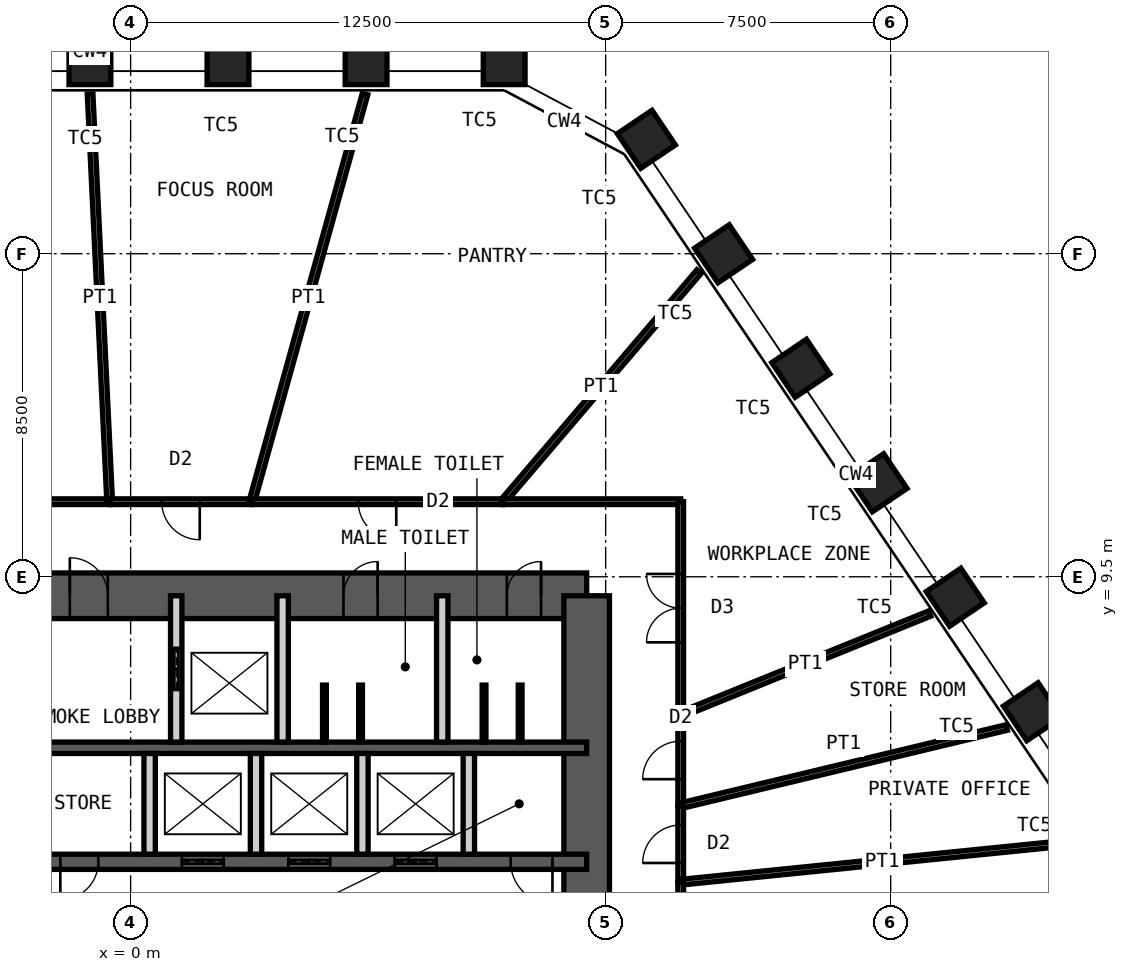
"""IFC4 building model, lengths in metres.
Left out: names, types, materials, properties, quantities, classifications, styles, units other than length and angle.
Written with IfcOpenShell. Run it as: python <this file> out.ifc"""

import sys

from ifc_helpers import new_model, si_unit, direction, frame, frame_2d, origin, origin_2d, place, context, subcontext, project, spatial, rectangle, hollow_rectangle, extrude, element, fill, save


model = new_model("IFC4")
c1 = context("Model", 3, precision=1e-05, world=origin(), true_north=direction((0.0, 1.0)))
c2 = subcontext(c1, "Body", "Model", "MODEL_VIEW")
j1 = project(units=[si_unit("LENGTHUNIT", "METRE"), si_unit("PLANEANGLEUNIT", "RADIAN")], contexts=[c1])
p1 = place(None, origin())
s1 = spatial("IfcSite", under=j1, at=p1, CompositionType="ELEMENT")
p2 = place(p1, origin())
s2 = spatial("IfcBuilding", under=s1, at=p2, CompositionType="ELEMENT")
p3 = place(p2, frame((0.0, 0.0, 214.0)))
s3 = spatial("IfcBuildingStorey", under=s2, at=p3, CompositionType="ELEMENT", Elevation=214.0)
for number, where, z_axis, x_axis in (
    (1, (-1.071, 23.0, 0.0), (0.0, 0.0, 1.0), (-1.0, 0.0, 0.0)),
    (2, (2.562, 23.0, 0.0), (0.0, 0.0, 1.0), (-1.0, 0.0, 0.0)),
    (3, (6.196, 23.0, 0.0), (0.0, 0.0, 1.0), (-1.0, 0.0, 0.0)),
    (4, (9.829, 23.0, 0.0), (0.0, 0.0, 1.0), (-1.0, 0.0, 0.0)),
    (5, (13.571, 21.01, 0.0), (0.0, 0.0, 1.0), (-0.559, 0.829, 0.0)),
    (6, (15.603, 17.998, 0.0), (0.0, 0.0, 1.0), (-0.559, 0.829, 0.0)),
    (7, (17.635, 14.986, 0.0), (0.0, 0.0, 1.0), (-0.559, 0.829, 0.0)),
    (8, (19.667, 11.973, 0.0), (0.0, 0.0, 1.0), (-0.559, 0.829, 0.0)),
    (9, (21.699, 8.961, 0.0), (0.0, 0.0, 1.0), (-0.559, 0.829, 0.0)),
    (10, (23.731, 5.948, 0.0), (0.0, 0.0, 1.0), (-0.559, 0.829, 0.0)),
):
    element("IfcColumn", number, at=place(p3, frame(where, z_axis=z_axis, x_axis=x_axis)), inside=s3, PredefinedType="COLUMN", context=c2, shape_type="SweptSolid", body=[
        extrude(hollow_rectangle(XDim=1.1, YDim=1.1, WallThickness=0.07, at=origin_2d()), origin(), (0.0, 0.0, 1.0), 4.2),
    ])
p4 = place(p3, frame((-12.0, 9.0, 0.0), z_axis=(0.0, 0.0, 1.0), x_axis=(1.0, 0.0, 0.0)))
e11 = element("IfcWall", 11, at=p4, inside=s3, PredefinedType="SHEAR", context=c2, shape_type="SweptSolid", body=[
    extrude(rectangle(XDim=24.0, YDim=1.2, at=frame_2d((12.0, 0.0))), origin(), (0.0, 0.0, 1.0), 4.2),
])
p5 = place(p4, frame((10.4, 0.0, 0.0)))
e12 = element("IfcOpeningElement", 12, at=p5, cuts=e11, PredefinedType="OPENING", context=c2, shape_type="SweptSolid", body=[
    extrude(rectangle(XDim=1.0, YDim=2.1, at=frame_2d((0.5, 1.05))), frame((0.0, 0.61, 0.0), z_axis=(0.0, -1.0, 0.0), x_axis=(1.0, 0.0, 0.0)), (0.0, 0.0, 1.0), 1.22),
])
p6 = place(p4, frame((17.6, 0.0, 0.0)))
e13 = element("IfcOpeningElement", 13, at=p6, cuts=e11, PredefinedType="OPENING", context=c2, shape_type="SweptSolid", body=[
    extrude(rectangle(XDim=0.9, YDim=2.1, at=frame_2d((0.45, 1.05))), frame((0.0, 0.61, 0.0), z_axis=(0.0, -1.0, 0.0), x_axis=(1.0, 0.0, 0.0)), (0.0, 0.0, 1.0), 1.22),
])
p7 = place(p4, frame((21.9, 0.0, 0.0)))
e14 = element("IfcOpeningElement", 14, at=p7, cuts=e11, PredefinedType="OPENING", context=c2, shape_type="SweptSolid", body=[
    extrude(rectangle(XDim=0.9, YDim=2.1, at=frame_2d((0.45, 1.05))), frame((0.0, 0.61, 0.0), z_axis=(0.0, -1.0, 0.0), x_axis=(1.0, 0.0, 0.0)), (0.0, 0.0, 1.0), 1.22),
])
p8 = place(p3, frame((12.0, -9.0, 0.0), z_axis=(0.0, 0.0, 1.0), x_axis=(0.0, 1.0, 0.0)))
e15 = element("IfcWall", 15, at=p8, inside=s3, PredefinedType="SHEAR", context=c2, shape_type="SweptSolid", body=[
    extrude(rectangle(XDim=18.0, YDim=1.2, at=frame_2d((9.0, 0.0))), origin(), (0.0, 0.0, 1.0), 4.2),
])
p9 = place(p8, frame((8.1, 0.0, 0.0)))
e16 = element("IfcOpeningElement", 16, at=p9, cuts=e15, PredefinedType="OPENING", context=c2, shape_type="SweptSolid", body=[
    extrude(rectangle(XDim=1.8, YDim=2.1, at=frame_2d((0.9, 1.05))), frame((0.0, 0.61, 0.0), z_axis=(0.0, -1.0, 0.0), x_axis=(1.0, 0.0, 0.0)), (0.0, 0.0, 1.0), 1.22),
])
p10 = place(p3, frame((-12.0, 5.0, 0.0), z_axis=(0.0, 0.0, 1.0), x_axis=(1.0, 0.0, 0.0)))
e17 = element("IfcWall", 17, at=p10, inside=s3, PredefinedType="SHEAR", context=c2, shape_type="SweptSolid", body=[
    extrude(rectangle(XDim=24.0, YDim=0.3, at=frame_2d((12.0, 0.0))), origin(), (0.0, 0.0, 1.0), 4.2),
])
p11 = place(p3, frame((-12.0, 2.0, 0.0), z_axis=(0.0, 0.0, 1.0), x_axis=(1.0, 0.0, 0.0)))
e18 = element("IfcWall", 18, at=p11, inside=s3, PredefinedType="SHEAR", context=c2, shape_type="SweptSolid", body=[
    extrude(rectangle(XDim=24.0, YDim=0.4, at=frame_2d((12.0, 0.0))), origin(), (0.0, 0.0, 1.0), 4.2),
])
p12 = place(p11, frame((2.4, 0.0, 0.0)))
e19 = element("IfcOpeningElement", 19, at=p12, cuts=e18, PredefinedType="OPENING", context=c2, shape_type="SweptSolid", body=[
    extrude(rectangle(XDim=1.1, YDim=2.1, at=frame_2d((0.55, 1.05))), frame((0.0, 0.21, 0.0), z_axis=(0.0, -1.0, 0.0), x_axis=(1.0, 0.0, 0.0)), (0.0, 0.0, 1.0), 0.42),
])
p13 = place(p11, frame((22.0, 0.0, 0.0)))
e20 = element("IfcOpeningElement", 20, at=p13, cuts=e18, PredefinedType="OPENING", context=c2, shape_type="SweptSolid", body=[
    extrude(rectangle(XDim=1.1, YDim=2.1, at=frame_2d((0.55, 1.05))), frame((0.0, 0.21, 0.0), z_axis=(0.0, -1.0, 0.0), x_axis=(1.0, 0.0, 0.0)), (0.0, 0.0, 1.0), 0.42),
])
p14 = place(p11, frame((10.15, 0.0, 0.0)))
e21 = element("IfcOpeningElement", 21, at=p14, cuts=e18, PredefinedType="OPENING", context=c2, shape_type="SweptSolid", body=[
    extrude(rectangle(XDim=1.0, YDim=2.1, at=frame_2d((0.5, 1.05))), frame((0.0, 0.21, 0.0), z_axis=(0.0, -1.0, 0.0), x_axis=(1.0, 0.0, 0.0)), (0.0, 0.0, 1.0), 0.42),
])
p15 = place(p11, frame((6.9, 0.0, 0.0)))
e22 = element("IfcOpeningElement", 22, at=p15, cuts=e18, PredefinedType="OPENING", context=c2, shape_type="SweptSolid", body=[
    extrude(rectangle(XDim=1.0, YDim=2.1, at=frame_2d((0.5, 1.05))), frame((0.0, 0.21, 0.0), z_axis=(0.0, -1.0, 0.0), x_axis=(1.0, 0.0, 0.0)), (0.0, 0.0, 1.0), 0.42),
])
p16 = place(p11, frame((13.35, 0.0, 0.0)))
e23 = element("IfcOpeningElement", 23, at=p16, cuts=e18, PredefinedType="OPENING", context=c2, shape_type="SweptSolid", body=[
    extrude(rectangle(XDim=1.1, YDim=2.4, at=frame_2d((0.55, 1.2))), frame((0.0, 0.21, 0.0), z_axis=(0.0, -1.0, 0.0), x_axis=(1.0, 0.0, 0.0)), (0.0, 0.0, 1.0), 0.42),
])
p17 = place(p11, frame((16.15, 0.0, 0.0)))
e24 = element("IfcOpeningElement", 24, at=p17, cuts=e18, PredefinedType="OPENING", context=c2, shape_type="SweptSolid", body=[
    extrude(rectangle(XDim=1.1, YDim=2.4, at=frame_2d((0.55, 1.2))), frame((0.0, 0.21, 0.0), z_axis=(0.0, -1.0, 0.0), x_axis=(1.0, 0.0, 0.0)), (0.0, 0.0, 1.0), 0.42),
])
p18 = place(p11, frame((18.95, 0.0, 0.0)))
e25 = element("IfcOpeningElement", 25, at=p18, cuts=e18, PredefinedType="OPENING", context=c2, shape_type="SweptSolid", body=[
    extrude(rectangle(XDim=1.1, YDim=2.4, at=frame_2d((0.55, 1.2))), frame((0.0, 0.21, 0.0), z_axis=(0.0, -1.0, 0.0), x_axis=(1.0, 0.0, 0.0)), (0.0, 0.0, 1.0), 0.42),
])
p19 = place(p3, frame((1.2, 5.15, 0.0), z_axis=(0.0, 0.0, 1.0), x_axis=(0.0, 1.0, 0.0)))
e26 = element("IfcWall", 26, at=p19, inside=s3, PredefinedType="PARTITIONING", context=c2, shape_type="SweptSolid", body=[
    extrude(rectangle(XDim=3.85, YDim=0.3, at=frame_2d((1.925, 0.0))), origin(), (0.0, 0.0, 1.0), 3.98),
])
p20 = place(p19, frame((1.375, 0.0, 0.0)))
e27 = element("IfcOpeningElement", 27, at=p20, cuts=e26, PredefinedType="OPENING", context=c2, shape_type="SweptSolid", body=[
    extrude(rectangle(XDim=1.1, YDim=2.4, at=frame_2d((0.55, 1.2))), frame((0.0, 0.16, 0.0), z_axis=(0.0, -1.0, 0.0), x_axis=(1.0, 0.0, 0.0)), (0.0, 0.0, 1.0), 0.32),
])
for number, where, z_axis, x_axis in (
    (28, (4.0, 5.15, 0.0), (0.0, 0.0, 1.0), (0.0, 1.0, 0.0)),
    (29, (8.2, 5.15, 0.0), (0.0, 0.0, 1.0), (0.0, 1.0, 0.0)),
):
    element("IfcWall", number, at=place(p3, frame(where, z_axis=z_axis, x_axis=x_axis)), inside=s3, PredefinedType="PARTITIONING", context=c2, shape_type="SweptSolid", body=[
        extrude(rectangle(XDim=3.85, YDim=0.3, at=frame_2d((1.925, 0.0))), origin(), (0.0, 0.0, 1.0), 3.98),
    ])
for number, where, z_axis, x_axis in (
    (30, (0.5, 2.2, 0.0), (0.0, 0.0, 1.0), (0.0, 1.0, 0.0)),
    (31, (3.3, 2.2, 0.0), (0.0, 0.0, 1.0), (0.0, 1.0, 0.0)),
    (32, (6.1, 2.2, 0.0), (0.0, 0.0, 1.0), (0.0, 1.0, 0.0)),
    (33, (8.9, 2.2, 0.0), (0.0, 0.0, 1.0), (0.0, 1.0, 0.0)),
):
    element("IfcWall", number, at=place(p3, frame(where, z_axis=z_axis, x_axis=x_axis)), inside=s3, PredefinedType="PARTITIONING", context=c2, shape_type="SweptSolid", body=[
        extrude(rectangle(XDim=2.65, YDim=0.3, at=frame_2d((1.325, 0.0))), origin(), (0.0, 0.0, 1.0), 3.98),
    ])
for number, where, z_axis, x_axis in (
    (34, (5.1, 5.15, 0.0), (0.0, 0.0, 1.0), (0.0, 1.0, 0.0)),
    (35, (6.05, 5.15, 0.0), (0.0, 0.0, 1.0), (0.0, 1.0, 0.0)),
    (36, (9.3, 5.15, 0.0), (0.0, 0.0, 1.0), (0.0, 1.0, 0.0)),
    (37, (10.25, 5.15, 0.0), (0.0, 0.0, 1.0), (0.0, 1.0, 0.0)),
):
    element("IfcWall", number, at=place(p3, frame(where, z_axis=z_axis, x_axis=x_axis)), inside=s3, PredefinedType="PARTITIONING", context=c2, shape_type="SweptSolid", body=[
        extrude(rectangle(XDim=1.5, YDim=0.1, at=frame_2d((0.75, 0.0))), origin(), (0.0, 0.0, 1.0), 2.1),
    ])
p21 = place(p3, frame((-10.889, 11.475, 0.0), z_axis=(0.0, 0.0, 1.0), x_axis=(1.0, 0.0, 0.0)))
e38 = element("IfcWall", 38, at=p21, inside=s3, PredefinedType="PARTITIONING", context=c2, shape_type="SweptSolid", body=[
    extrude(rectangle(XDim=10.337, YDim=0.15, at=frame_2d((5.169, 0.0))), origin(), (0.0, 0.0, 1.0), 4.03),
])
p22 = place(p21, frame((4.269, 0.0, 0.0)))
e39 = element("IfcOpeningElement", 39, at=p22, cuts=e38, PredefinedType="OPENING", context=c2, shape_type="SweptSolid", body=[
    extrude(rectangle(XDim=1.8, YDim=2.4, at=frame_2d((0.9, 1.2))), frame((0.0, 0.085, 0.0), z_axis=(0.0, -1.0, 0.0), x_axis=(1.0, 0.0, 0.0)), (0.0, 0.0, 1.0), 0.17),
])
p23 = place(p3, frame((-1.067, 22.2, 0.0), z_axis=(0.0, 0.0, 1.0), x_axis=(0.047998335863, -0.998847415652, 0.0)))
e40 = element("IfcWall", 40, at=p23, inside=s3, PredefinedType="PARTITIONING", context=c2, shape_type="SweptSolid", body=[
    extrude(rectangle(XDim=10.738, YDim=0.15, at=frame_2d((5.369, 0.0))), origin(), (0.0, 0.0, 1.0), 3.43),
])
p24 = place(p3, frame((-0.551, 11.475, 0.0), z_axis=(0.0, 0.0, 1.0), x_axis=(1.0, 0.0, 0.0)))
e41 = element("IfcWall", 41, at=p24, inside=s3, PredefinedType="PARTITIONING", context=c2, shape_type="SweptSolid", body=[
    extrude(rectangle(XDim=3.74, YDim=0.15, at=frame_2d((1.87, 0.0))), origin(), (0.0, 0.0, 1.0), 4.03),
])
p25 = place(p24, frame((1.37, 0.0, 0.0)))
e42 = element("IfcOpeningElement", 42, at=p25, cuts=e41, PredefinedType="OPENING", context=c2, shape_type="SweptSolid", body=[
    extrude(rectangle(XDim=1.0, YDim=2.4, at=frame_2d((0.5, 1.2))), frame((0.0, 0.085, 0.0), z_axis=(0.0, -1.0, 0.0), x_axis=(1.0, 0.0, 0.0)), (0.0, 0.0, 1.0), 0.17),
])
p26 = place(p3, frame((6.169, 22.204, 0.0), z_axis=(0.0, 0.0, 1.0), x_axis=(-0.26769135876, -0.963504715321, 0.0)))
e43 = element("IfcWall", 43, at=p26, inside=s3, PredefinedType="PARTITIONING", context=c2, shape_type="SweptSolid", body=[
    extrude(rectangle(XDim=11.135, YDim=0.15, at=frame_2d((5.567, 0.0))), origin(), (0.0, 0.0, 1.0), 3.43),
])
p27 = place(p3, frame((3.188, 11.475, 0.0), z_axis=(0.0, 0.0, 1.0), x_axis=(1.0, 0.0, 0.0)))
e44 = element("IfcWall", 44, at=p27, inside=s3, PredefinedType="PARTITIONING", context=c2, shape_type="SweptSolid", body=[
    extrude(rectangle(XDim=6.603, YDim=0.15, at=frame_2d((3.301, 0.0))), origin(), (0.0, 0.0, 1.0), 4.03),
])
p28 = place(p27, frame((2.802, 0.0, 0.0)))
e45 = element("IfcOpeningElement", 45, at=p28, cuts=e44, PredefinedType="OPENING", context=c2, shape_type="SweptSolid", body=[
    extrude(rectangle(XDim=1.0, YDim=2.4, at=frame_2d((0.5, 1.2))), frame((0.0, 0.085, 0.0), z_axis=(0.0, -1.0, 0.0), x_axis=(1.0, 0.0, 0.0)), (0.0, 0.0, 1.0), 0.17),
])
p29 = place(p3, frame((14.958, 17.531, 0.0), z_axis=(0.0, 0.0, 1.0), x_axis=(-0.649097500837, -0.760705221756, 0.0)))
e46 = element("IfcWall", 46, at=p29, inside=s3, PredefinedType="PARTITIONING", context=c2, shape_type="SweptSolid", body=[
    extrude(rectangle(XDim=7.96, YDim=0.15, at=frame_2d((3.98, 0.0))), origin(), (0.0, 0.0, 1.0), 3.43),
])
p30 = place(p3, frame((9.791, 11.475, 0.0), z_axis=(0.0, 0.0, 1.0), x_axis=(1.0, 0.0, 0.0)))
e47 = element("IfcWall", 47, at=p30, inside=s3, PredefinedType="PARTITIONING", context=c2, shape_type="SweptSolid", body=[
    extrude(rectangle(XDim=4.684, YDim=0.15, at=frame_2d((2.342, 0.0))), origin(), (0.0, 0.0, 1.0), 4.03),
])
p31 = place(p3, frame((14.475, 11.475, 0.0), z_axis=(0.0, 0.0, 1.0), x_axis=(0.0, -1.0, 0.0)))
e48 = element("IfcWall", 48, at=p31, inside=s3, PredefinedType="PARTITIONING", context=c2, shape_type="SweptSolid", body=[
    extrude(rectangle(XDim=5.601, YDim=0.15, at=frame_2d((2.801, 0.0))), origin(), (0.0, 0.0, 1.0), 4.03),
])
p32 = place(p31, frame((1.901, 0.0, 0.0)))
e49 = element("IfcOpeningElement", 49, at=p32, cuts=e48, PredefinedType="OPENING", context=c2, shape_type="SweptSolid", body=[
    extrude(rectangle(XDim=1.8, YDim=2.4, at=frame_2d((0.9, 1.2))), frame((0.0, 0.085, 0.0), z_axis=(0.0, -1.0, 0.0), x_axis=(1.0, 0.0, 0.0)), (0.0, 0.0, 1.0), 0.17),
])
p33 = place(p3, frame((21.026, 8.532, 0.0), z_axis=(0.0, 0.0, 1.0), x_axis=(-0.926617028548, -0.376006492503, 0.0)))
e50 = element("IfcWall", 50, at=p33, inside=s3, PredefinedType="PARTITIONING", context=c2, shape_type="SweptSolid", body=[
    extrude(rectangle(XDim=7.07, YDim=0.15, at=frame_2d((3.535, 0.0))), origin(), (0.0, 0.0, 1.0), 3.43),
])
p34 = place(p3, frame((14.475, 5.874, 0.0), z_axis=(0.0, 0.0, 1.0), x_axis=(0.0, -1.0, 0.0)))
e51 = element("IfcWall", 51, at=p34, inside=s3, PredefinedType="PARTITIONING", context=c2, shape_type="SweptSolid", body=[
    extrude(rectangle(XDim=2.399, YDim=0.15, at=frame_2d((1.2, 0.0))), origin(), (0.0, 0.0, 1.0), 4.03),
])
p35 = place(p34, frame((0.699, 0.0, 0.0)))
e52 = element("IfcOpeningElement", 52, at=p35, cuts=e51, PredefinedType="OPENING", context=c2, shape_type="SweptSolid", body=[
    extrude(rectangle(XDim=1.0, YDim=2.4, at=frame_2d((0.5, 1.2))), frame((0.0, 0.085, 0.0), z_axis=(0.0, -1.0, 0.0), x_axis=(1.0, 0.0, 0.0)), (0.0, 0.0, 1.0), 0.17),
])
p36 = place(p3, frame((23.053, 5.534, 0.0), z_axis=(0.0, 0.0, 1.0), x_axis=(-0.972377252501, -0.233414821335, 0.0)))
e53 = element("IfcWall", 53, at=p36, inside=s3, PredefinedType="PARTITIONING", context=c2, shape_type="SweptSolid", body=[
    extrude(rectangle(XDim=8.822, YDim=0.15, at=frame_2d((4.411, 0.0))), origin(), (0.0, 0.0, 1.0), 3.43),
])
p37 = place(p3, frame((14.475, 3.475, 0.0), z_axis=(0.0, 0.0, 1.0), x_axis=(0.0, -1.0, 0.0)))
e54 = element("IfcWall", 54, at=p37, inside=s3, PredefinedType="PARTITIONING", context=c2, shape_type="SweptSolid", body=[
    extrude(rectangle(XDim=2.012, YDim=0.15, at=frame_2d((1.006, 0.0))), origin(), (0.0, 0.0, 1.0), 4.03),
])
p38 = place(p37, frame((0.506, 0.0, 0.0)))
e55 = element("IfcOpeningElement", 55, at=p38, cuts=e54, PredefinedType="OPENING", context=c2, shape_type="SweptSolid", body=[
    extrude(rectangle(XDim=1.0, YDim=2.4, at=frame_2d((0.5, 1.2))), frame((0.0, 0.085, 0.0), z_axis=(0.0, -1.0, 0.0), x_axis=(1.0, 0.0, 0.0)), (0.0, 0.0, 1.0), 0.17),
])
p39 = place(p3, frame((25.083, 2.535, 0.0), z_axis=(0.0, 0.0, 1.0), x_axis=(-0.994932122767, -0.10054884925, 0.0)))
e56 = element("IfcWall", 56, at=p39, inside=s3, PredefinedType="PARTITIONING", context=c2, shape_type="SweptSolid", body=[
    extrude(rectangle(XDim=10.662, YDim=0.15, at=frame_2d((5.331, 0.0))), origin(), (0.0, 0.0, 1.0), 2.93),
])
p40 = place(p3, frame((14.475, 1.463, 0.0), z_axis=(0.0, 0.0, 1.0), x_axis=(0.0, -1.0, 0.0)))
e57 = element("IfcWall", 57, at=p40, inside=s3, PredefinedType="PARTITIONING", context=c2, shape_type="SweptSolid", body=[
    extrude(rectangle(XDim=3.885, YDim=0.15, at=frame_2d((1.942, 0.0))), origin(), (0.0, 0.0, 1.0), 4.03),
])
p41 = place(p40, frame((1.442, 0.0, 0.0)))
e58 = element("IfcOpeningElement", 58, at=p41, cuts=e57, PredefinedType="OPENING", context=c2, shape_type="SweptSolid", body=[
    extrude(rectangle(XDim=1.0, YDim=2.4, at=frame_2d((0.5, 1.2))), frame((0.0, 0.085, 0.0), z_axis=(0.0, -1.0, 0.0), x_axis=(1.0, 0.0, 0.0)), (0.0, 0.0, 1.0), 0.17),
])
p42 = place(p5, origin())
e59 = element("IfcDoor", 59, at=p42, inside=s3, OperationType="SINGLE_SWING_RIGHT", PredefinedType="DOOR", context=c2, shape_type="SweptSolid", body=[
    extrude(rectangle(XDim=1.0, YDim=2.1, at=frame_2d((0.5, 1.05))), frame((0.0, 0.025, 0.0), z_axis=(0.0, -1.0, 0.0), x_axis=(1.0, 0.0, 0.0)), (0.0, 0.0, 1.0), 0.05),
])
fill(e12, e59)
p43 = place(p6, origin())
e60 = element("IfcDoor", 60, at=p43, inside=s3, OperationType="SINGLE_SWING_LEFT", PredefinedType="DOOR", context=c2, shape_type="SweptSolid", body=[
    extrude(rectangle(XDim=0.9, YDim=2.1, at=frame_2d((0.45, 1.05))), frame((0.0, 0.025, 0.0), z_axis=(0.0, -1.0, 0.0), x_axis=(1.0, 0.0, 0.0)), (0.0, 0.0, 1.0), 0.05),
])
fill(e13, e60)
p44 = place(p7, origin())
e61 = element("IfcDoor", 61, at=p44, inside=s3, OperationType="SINGLE_SWING_LEFT", PredefinedType="DOOR", context=c2, shape_type="SweptSolid", body=[
    extrude(rectangle(XDim=0.9, YDim=2.1, at=frame_2d((0.45, 1.05))), frame((0.0, 0.025, 0.0), z_axis=(0.0, -1.0, 0.0), x_axis=(1.0, 0.0, 0.0)), (0.0, 0.0, 1.0), 0.05),
])
fill(e14, e61)
p45 = place(p13, origin())
e62 = element("IfcDoor", 62, at=p45, inside=s3, OperationType="SINGLE_SWING_RIGHT", PredefinedType="DOOR", context=c2, shape_type="SweptSolid", body=[
    extrude(rectangle(XDim=1.1, YDim=2.1, at=frame_2d((0.55, 1.05))), frame((0.0, 0.025, 0.0), z_axis=(0.0, -1.0, 0.0), x_axis=(1.0, 0.0, 0.0)), (0.0, 0.0, 1.0), 0.05),
])
fill(e20, e62)
p46 = place(p14, origin())
e63 = element("IfcDoor", 63, at=p46, inside=s3, OperationType="SINGLE_SWING_LEFT", PredefinedType="DOOR", context=c2, shape_type="SweptSolid", body=[
    extrude(rectangle(XDim=1.0, YDim=2.1, at=frame_2d((0.5, 1.05))), frame((0.0, 0.025, 0.0), z_axis=(0.0, -1.0, 0.0), x_axis=(1.0, 0.0, 0.0)), (0.0, 0.0, 1.0), 0.05),
])
fill(e21, e63)
p47 = place(p20, origin())
e64 = element("IfcDoor", 64, at=p47, inside=s3, OperationType="DOUBLE_DOOR_SLIDING", PredefinedType="DOOR", context=c2, shape_type="SweptSolid", body=[
    extrude(rectangle(XDim=1.1, YDim=2.4, at=frame_2d((0.55, 1.2))), frame((0.0, 0.025, 0.0), z_axis=(0.0, -1.0, 0.0), x_axis=(1.0, 0.0, 0.0)), (0.0, 0.0, 1.0), 0.05),
])
fill(e27, e64)
p48 = place(p16, origin())
e65 = element("IfcDoor", 65, at=p48, inside=s3, OperationType="DOUBLE_DOOR_SLIDING", PredefinedType="DOOR", context=c2, shape_type="SweptSolid", body=[
    extrude(rectangle(XDim=1.1, YDim=2.4, at=frame_2d((0.55, 1.2))), frame((0.0, 0.025, 0.0), z_axis=(0.0, -1.0, 0.0), x_axis=(1.0, 0.0, 0.0)), (0.0, 0.0, 1.0), 0.05),
])
fill(e23, e65)
p49 = place(p17, origin())
e66 = element("IfcDoor", 66, at=p49, inside=s3, OperationType="DOUBLE_DOOR_SLIDING", PredefinedType="DOOR", context=c2, shape_type="SweptSolid", body=[
    extrude(rectangle(XDim=1.1, YDim=2.4, at=frame_2d((0.55, 1.2))), frame((0.0, 0.025, 0.0), z_axis=(0.0, -1.0, 0.0), x_axis=(1.0, 0.0, 0.0)), (0.0, 0.0, 1.0), 0.05),
])
fill(e24, e66)
p50 = place(p18, origin())
e67 = element("IfcDoor", 67, at=p50, inside=s3, OperationType="DOUBLE_DOOR_SLIDING", PredefinedType="DOOR", context=c2, shape_type="SweptSolid", body=[
    extrude(rectangle(XDim=1.1, YDim=2.4, at=frame_2d((0.55, 1.2))), frame((0.0, 0.025, 0.0), z_axis=(0.0, -1.0, 0.0), x_axis=(1.0, 0.0, 0.0)), (0.0, 0.0, 1.0), 0.05),
])
fill(e25, e67)
p51 = place(p25, origin())
e68 = element("IfcDoor", 68, at=p51, inside=s3, OperationType="SINGLE_SWING_RIGHT", PredefinedType="DOOR", context=c2, shape_type="SweptSolid", body=[
    extrude(rectangle(XDim=1.0, YDim=2.4, at=frame_2d((0.5, 1.2))), frame((0.0, 0.025, 0.0), z_axis=(0.0, -1.0, 0.0), x_axis=(1.0, 0.0, 0.0)), (0.0, 0.0, 1.0), 0.05),
])
fill(e42, e68)
p52 = place(p28, origin())
e69 = element("IfcDoor", 69, at=p52, inside=s3, OperationType="SINGLE_SWING_RIGHT", PredefinedType="DOOR", context=c2, shape_type="SweptSolid", body=[
    extrude(rectangle(XDim=1.0, YDim=2.4, at=frame_2d((0.5, 1.2))), frame((0.0, 0.025, 0.0), z_axis=(0.0, -1.0, 0.0), x_axis=(1.0, 0.0, 0.0)), (0.0, 0.0, 1.0), 0.05),
])
fill(e45, e69)
p53 = place(p32, origin())
e70 = element("IfcDoor", 70, at=p53, inside=s3, OperationType="DOUBLE_DOOR_DOUBLE_SWING", PredefinedType="DOOR", context=c2, shape_type="SweptSolid", body=[
    extrude(rectangle(XDim=1.8, YDim=2.4, at=frame_2d((0.9, 1.2))), frame((0.0, 0.025, 0.0), z_axis=(0.0, -1.0, 0.0), x_axis=(1.0, 0.0, 0.0)), (0.0, 0.0, 1.0), 0.05),
])
fill(e49, e70)
p54 = place(p35, origin())
e71 = element("IfcDoor", 71, at=p54, inside=s3, OperationType="SINGLE_SWING_RIGHT", PredefinedType="DOOR", context=c2, shape_type="SweptSolid", body=[
    extrude(rectangle(XDim=1.0, YDim=2.4, at=frame_2d((0.5, 1.2))), frame((0.0, 0.025, 0.0), z_axis=(0.0, -1.0, 0.0), x_axis=(1.0, 0.0, 0.0)), (0.0, 0.0, 1.0), 0.05),
])
fill(e52, e71)
p55 = place(p38, origin())
e72 = element("IfcDoor", 72, at=p55, inside=s3, OperationType="SINGLE_SWING_RIGHT", PredefinedType="DOOR", context=c2, shape_type="SweptSolid", body=[
    extrude(rectangle(XDim=1.0, YDim=2.4, at=frame_2d((0.5, 1.2))), frame((0.0, 0.025, 0.0), z_axis=(0.0, -1.0, 0.0), x_axis=(1.0, 0.0, 0.0)), (0.0, 0.0, 1.0), 0.05),
])
fill(e55, e72)
save(model, sys.argv[1])
